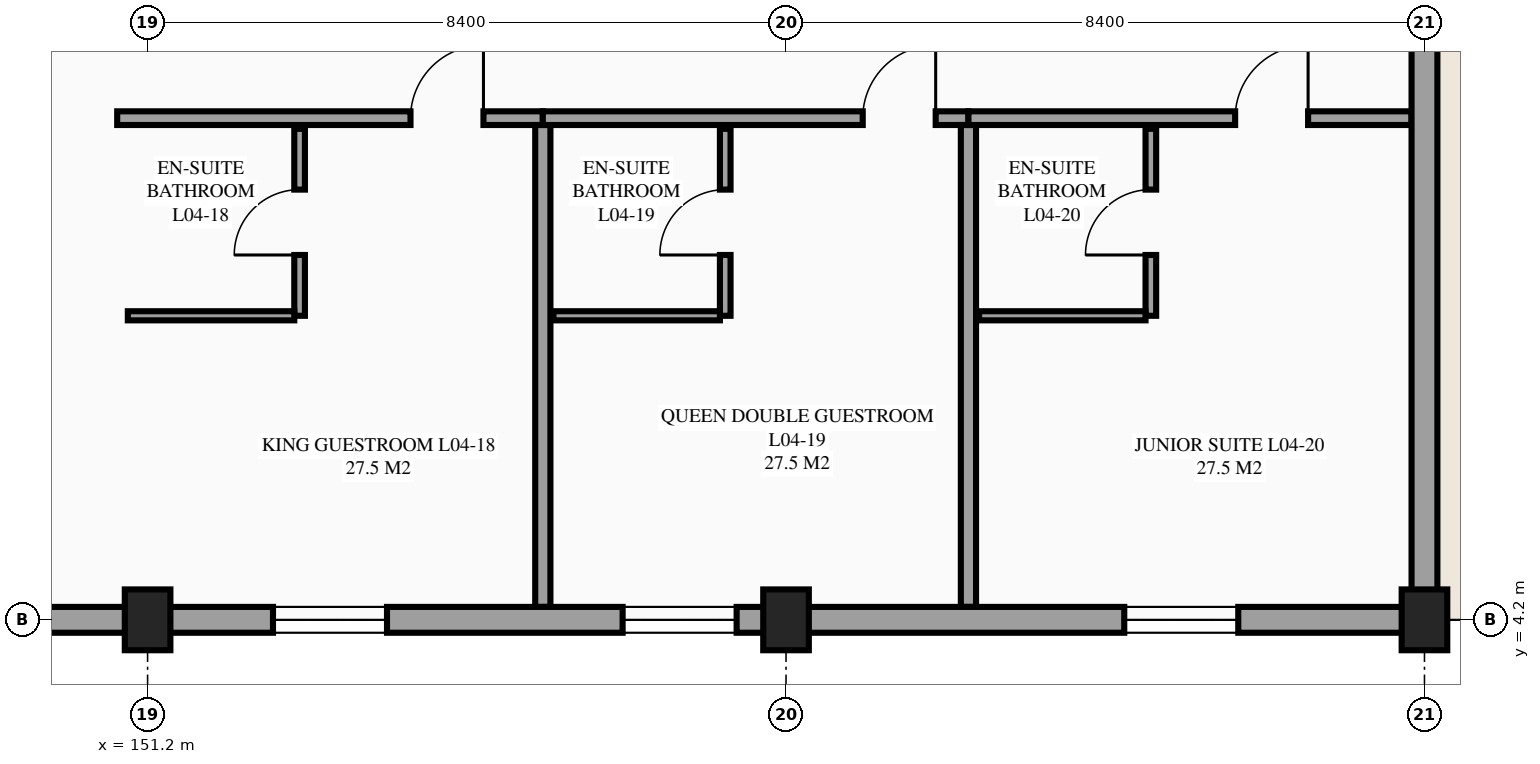
"""IFC4 building model, lengths in metres.
Left out: names, types, materials, properties, quantities, classifications, styles, units other than length and angle.
Written with IfcOpenShell. Run it as: python <this file> out.ifc"""

import sys

from ifc_helpers import new_model, si_unit, direction, frame, frame_2d, origin, origin_2d, place, context, subcontext, project, spatial, rectangle, extrude, element, fill, save


model = new_model("IFC4")
c1 = context("Model", 3, precision=1e-05, world=origin(), true_north=direction((0.0, 1.0)))
c2 = subcontext(c1, "Body", "Model", "MODEL_VIEW")
j1 = project(units=[si_unit("LENGTHUNIT", "METRE"), si_unit("PLANEANGLEUNIT", "RADIAN")], contexts=[c1])
p1 = place(None, origin())
s1 = spatial("IfcSite", under=j1, at=p1, CompositionType="ELEMENT")
p2 = place(p1, origin())
s2 = spatial("IfcBuilding", under=s1, at=p2, CompositionType="ELEMENT")
p3 = place(p2, frame((0.0, 0.0, 18.3)))
s3 = spatial("IfcBuildingStorey", under=s2, at=p3, CompositionType="ELEMENT", Elevation=18.3)
for number, where, z_axis, x_axis in (
    (1, (151.2, 4.2, 0.0), (0.0, 0.0, 1.0), (1.0, 0.0, 0.0)),
    (2, (159.6, 4.2, 0.0), (0.0, 0.0, 1.0), (1.0, 0.0, 0.0)),
    (3, (168.0, 4.2, 0.0), (0.0, 0.0, 1.0), (1.0, 0.0, 0.0)),
):
    element("IfcColumn", number, at=place(p3, frame(where, z_axis=z_axis, x_axis=x_axis)), inside=s3, PredefinedType="COLUMN", context=c2, shape_type="SweptSolid", body=[
        extrude(rectangle(XDim=0.6, YDim=0.8, at=origin_2d()), origin(), (0.0, 0.0, 1.0), 3.6),
    ])
p4 = place(p3, frame((150.8, 10.8, 0.0), z_axis=(0.0, 0.0, 1.0), x_axis=(1.0, 0.0, 0.0)))
e4 = element("IfcWall", 4, at=p4, inside=s3, PredefinedType="PARTITIONING", context=c2, shape_type="SweptSolid", body=[
    extrude(rectangle(XDim=5.6, YDim=0.18, at=frame_2d((2.8, 0.0))), origin(), (0.0, 0.0, 1.0), 3.375),
])
p5 = place(p4, frame((3.859, 0.0, 0.0)))
e5 = element("IfcOpeningElement", 5, at=p5, cuts=e4, PredefinedType="OPENING", context=c2, shape_type="SweptSolid", body=[
    extrude(rectangle(XDim=0.96, YDim=2.15, at=frame_2d((0.48, 1.075))), frame((0.0, 0.1, 0.0), z_axis=(0.0, -1.0, 0.0), x_axis=(1.0, 0.0, 0.0)), (0.0, 0.0, 1.0), 0.2),
])
p6 = place(p3, frame((156.4, 4.37, 0.0), z_axis=(0.0, 0.0, 1.0), x_axis=(0.0, 1.0, 0.0)))
e6 = element("IfcWall", 6, at=p6, inside=s3, PredefinedType="PARTITIONING", context=c2, shape_type="SweptSolid", body=[
    extrude(rectangle(XDim=6.34, YDim=0.2, at=frame_2d((3.17, 0.0))), origin(), (0.0, 0.0, 1.0), 3.375),
])
p7 = place(p3, frame((153.2, 8.2, 0.0), z_axis=(0.0, 0.0, 1.0), x_axis=(0.0, 1.0, 0.0)))
e7 = element("IfcWall", 7, at=p7, inside=s3, PredefinedType="PARTITIONING", context=c2, shape_type="SweptSolid", body=[
    extrude(rectangle(XDim=2.46, YDim=0.14, at=frame_2d((1.23, 0.0))), origin(), (0.0, 0.0, 1.0), 3.375),
])
p8 = place(p7, frame((0.8, 0.0, 0.0)))
e8 = element("IfcOpeningElement", 8, at=p8, cuts=e7, PredefinedType="OPENING", context=c2, shape_type="SweptSolid", body=[
    extrude(rectangle(XDim=0.86, YDim=2.1, at=frame_2d((0.43, 1.05))), frame((0.0, 0.08, 0.0), z_axis=(0.0, -1.0, 0.0), x_axis=(1.0, 0.0, 0.0)), (0.0, 0.0, 1.0), 0.16),
])
p9 = place(p3, frame((150.94, 8.2, 0.0), z_axis=(0.0, 0.0, 1.0), x_axis=(1.0, 0.0, 0.0)))
e9 = element("IfcWall", 9, at=p9, inside=s3, PredefinedType="PARTITIONING", context=c2, shape_type="SweptSolid", body=[
    extrude(rectangle(XDim=2.19, YDim=0.12, at=frame_2d((1.095, 0.0))), origin(), (0.0, 0.0, 1.0), 3.375),
])
p10 = place(p3, frame((156.4, 10.8, 0.0), z_axis=(0.0, 0.0, 1.0), x_axis=(1.0, 0.0, 0.0)))
e10 = element("IfcWall", 10, at=p10, inside=s3, PredefinedType="PARTITIONING", context=c2, shape_type="SweptSolid", body=[
    extrude(rectangle(XDim=5.6, YDim=0.18, at=frame_2d((2.8, 0.0))), origin(), (0.0, 0.0, 1.0), 3.375),
])
p11 = place(p10, frame((4.209, 0.0, 0.0)))
e11 = element("IfcOpeningElement", 11, at=p11, cuts=e10, PredefinedType="OPENING", context=c2, shape_type="SweptSolid", body=[
    extrude(rectangle(XDim=0.96, YDim=2.15, at=frame_2d((0.48, 1.075))), frame((0.0, 0.1, 0.0), z_axis=(0.0, -1.0, 0.0), x_axis=(1.0, 0.0, 0.0)), (0.0, 0.0, 1.0), 0.2),
])
p12 = place(p3, frame((162.0, 4.37, 0.0), z_axis=(0.0, 0.0, 1.0), x_axis=(0.0, 1.0, 0.0)))
e12 = element("IfcWall", 12, at=p12, inside=s3, PredefinedType="PARTITIONING", context=c2, shape_type="SweptSolid", body=[
    extrude(rectangle(XDim=6.34, YDim=0.2, at=frame_2d((3.17, 0.0))), origin(), (0.0, 0.0, 1.0), 3.375),
])
p13 = place(p3, frame((158.8, 8.2, 0.0), z_axis=(0.0, 0.0, 1.0), x_axis=(0.0, 1.0, 0.0)))
e13 = element("IfcWall", 13, at=p13, inside=s3, PredefinedType="PARTITIONING", context=c2, shape_type="SweptSolid", body=[
    extrude(rectangle(XDim=2.46, YDim=0.14, at=frame_2d((1.23, 0.0))), origin(), (0.0, 0.0, 1.0), 3.375),
])
p14 = place(p13, frame((0.8, 0.0, 0.0)))
e14 = element("IfcOpeningElement", 14, at=p14, cuts=e13, PredefinedType="OPENING", context=c2, shape_type="SweptSolid", body=[
    extrude(rectangle(XDim=0.86, YDim=2.1, at=frame_2d((0.43, 1.05))), frame((0.0, 0.08, 0.0), z_axis=(0.0, -1.0, 0.0), x_axis=(1.0, 0.0, 0.0)), (0.0, 0.0, 1.0), 0.16),
])
p15 = place(p3, frame((156.54, 8.2, 0.0), z_axis=(0.0, 0.0, 1.0), x_axis=(1.0, 0.0, 0.0)))
e15 = element("IfcWall", 15, at=p15, inside=s3, PredefinedType="PARTITIONING", context=c2, shape_type="SweptSolid", body=[
    extrude(rectangle(XDim=2.19, YDim=0.12, at=frame_2d((1.095, 0.0))), origin(), (0.0, 0.0, 1.0), 3.375),
])
p16 = place(p3, frame((162.0, 10.8, 0.0), z_axis=(0.0, 0.0, 1.0), x_axis=(1.0, 0.0, 0.0)))
e16 = element("IfcWall", 16, at=p16, inside=s3, PredefinedType="PARTITIONING", context=c2, shape_type="SweptSolid", body=[
    extrude(rectangle(XDim=5.83, YDim=0.18, at=frame_2d((2.915, 0.0))), origin(), (0.0, 0.0, 1.0), 3.375),
])
p17 = place(p16, frame((3.509, 0.0, 0.0)))
e17 = element("IfcOpeningElement", 17, at=p17, cuts=e16, PredefinedType="OPENING", context=c2, shape_type="SweptSolid", body=[
    extrude(rectangle(XDim=0.96, YDim=2.15, at=frame_2d((0.48, 1.075))), frame((0.0, 0.1, 0.0), z_axis=(0.0, -1.0, 0.0), x_axis=(1.0, 0.0, 0.0)), (0.0, 0.0, 1.0), 0.2),
])
p18 = place(p3, frame((164.4, 8.2, 0.0), z_axis=(0.0, 0.0, 1.0), x_axis=(0.0, 1.0, 0.0)))
e18 = element("IfcWall", 18, at=p18, inside=s3, PredefinedType="PARTITIONING", context=c2, shape_type="SweptSolid", body=[
    extrude(rectangle(XDim=2.46, YDim=0.14, at=frame_2d((1.23, 0.0))), origin(), (0.0, 0.0, 1.0), 3.375),
])
p19 = place(p18, frame((0.8, 0.0, 0.0)))
e19 = element("IfcOpeningElement", 19, at=p19, cuts=e18, PredefinedType="OPENING", context=c2, shape_type="SweptSolid", body=[
    extrude(rectangle(XDim=0.86, YDim=2.1, at=frame_2d((0.43, 1.05))), frame((0.0, 0.08, 0.0), z_axis=(0.0, -1.0, 0.0), x_axis=(1.0, 0.0, 0.0)), (0.0, 0.0, 1.0), 0.16),
])
p20 = place(p3, frame((162.14, 8.2, 0.0), z_axis=(0.0, 0.0, 1.0), x_axis=(1.0, 0.0, 0.0)))
e20 = element("IfcWall", 20, at=p20, inside=s3, PredefinedType="PARTITIONING", context=c2, shape_type="SweptSolid", body=[
    extrude(rectangle(XDim=2.19, YDim=0.12, at=frame_2d((1.095, 0.0))), origin(), (0.0, 0.0, 1.0), 3.375),
])
p21 = place(p3, frame((142.8, 4.2, 0.0), z_axis=(0.0, 0.0, 1.0), x_axis=(1.0, 0.0, 0.0)))
e21 = element("IfcWall", 21, at=p21, inside=s3, PredefinedType="STANDARD", context=c2, shape_type="SweptSolid", body=[
    extrude(rectangle(XDim=8.4, YDim=0.34, at=frame_2d((4.2, 0.0))), origin(), (0.0, 0.0, 1.0), 3.126),
])
p22 = place(p3, frame((151.2, 4.2, 0.0), z_axis=(0.0, 0.0, 1.0), x_axis=(1.0, 0.0, 0.0)))
e22 = element("IfcWall", 22, at=p22, inside=s3, PredefinedType="STANDARD", context=c2, shape_type="SweptSolid", body=[
    extrude(rectangle(XDim=8.4, YDim=0.34, at=frame_2d((4.2, 0.0))), origin(), (0.0, 0.0, 1.0), 2.43),
])
p23 = place(p22, frame((1.65, 0.0, 0.85)))
e23 = element("IfcOpeningElement", 23, at=p23, cuts=e22, PredefinedType="OPENING", context=c2, shape_type="SweptSolid", body=[
    extrude(rectangle(XDim=1.5, YDim=1.5, at=frame_2d((0.75, 0.75))), frame((0.0, 0.18, 0.0), z_axis=(0.0, -1.0, 0.0), x_axis=(1.0, 0.0, 0.0)), (0.0, 0.0, 1.0), 0.36),
])
p24 = place(p22, frame((6.25, 0.0, 0.85)))
e24 = element("IfcOpeningElement", 24, at=p24, cuts=e22, PredefinedType="OPENING", context=c2, shape_type="SweptSolid", body=[
    extrude(rectangle(XDim=1.5, YDim=1.5, at=frame_2d((0.75, 0.75))), frame((0.0, 0.18, 0.0), z_axis=(0.0, -1.0, 0.0), x_axis=(1.0, 0.0, 0.0)), (0.0, 0.0, 1.0), 0.36),
])
p25 = place(p3, frame((159.6, 4.2, 0.0), z_axis=(0.0, 0.0, 1.0), x_axis=(1.0, 0.0, 0.0)))
e25 = element("IfcWall", 25, at=p25, inside=s3, PredefinedType="STANDARD", context=c2, shape_type="SweptSolid", body=[
    extrude(rectangle(XDim=8.4, YDim=0.34, at=frame_2d((4.2, 0.0))), origin(), (0.0, 0.0, 1.0), 2.53),
])
p26 = place(p25, frame((4.45, 0.0, 0.85)))
e26 = element("IfcOpeningElement", 26, at=p26, cuts=e25, PredefinedType="OPENING", context=c2, shape_type="SweptSolid", body=[
    extrude(rectangle(XDim=1.5, YDim=1.5, at=frame_2d((0.75, 0.75))), frame((0.0, 0.18, 0.0), z_axis=(0.0, -1.0, 0.0), x_axis=(1.0, 0.0, 0.0)), (0.0, 0.0, 1.0), 0.36),
])
p27 = place(p3, frame((168.0, 4.2, 0.0), z_axis=(0.0, 0.0, 1.0), x_axis=(0.0, 1.0, 0.0)))
e27 = element("IfcWall", 27, at=p27, inside=s3, PredefinedType="STANDARD", context=c2, shape_type="SweptSolid", body=[
    extrude(rectangle(XDim=8.4, YDim=0.34, at=frame_2d((4.2, 0.0))), origin(), (0.0, 0.0, 1.0), 2.78),
])
p28 = place(p23, origin())
e28 = element("IfcWindow", 28, at=p28, inside=s3, PartitioningType="SINGLE_PANEL", PredefinedType="WINDOW", context=c2, shape_type="SweptSolid", body=[
    extrude(rectangle(XDim=1.5, YDim=1.5, at=frame_2d((0.75, 0.75))), frame((0.0, 0.03, 0.0), z_axis=(0.0, -1.0, 0.0), x_axis=(1.0, 0.0, 0.0)), (0.0, 0.0, 1.0), 0.06),
])
fill(e23, e28)
p29 = place(p24, origin())
e29 = element("IfcWindow", 29, at=p29, inside=s3, PartitioningType="SINGLE_PANEL", PredefinedType="WINDOW", context=c2, shape_type="SweptSolid", body=[
    extrude(rectangle(XDim=1.5, YDim=1.5, at=frame_2d((0.75, 0.75))), frame((0.0, 0.03, 0.0), z_axis=(0.0, -1.0, 0.0), x_axis=(1.0, 0.0, 0.0)), (0.0, 0.0, 1.0), 0.06),
])
fill(e24, e29)
p30 = place(p26, origin())
e30 = element("IfcWindow", 30, at=p30, inside=s3, PartitioningType="SINGLE_PANEL", PredefinedType="WINDOW", context=c2, shape_type="SweptSolid", body=[
    extrude(rectangle(XDim=1.5, YDim=1.5, at=frame_2d((0.75, 0.75))), frame((0.0, 0.03, 0.0), z_axis=(0.0, -1.0, 0.0), x_axis=(1.0, 0.0, 0.0)), (0.0, 0.0, 1.0), 0.06),
])
fill(e26, e30)
p31 = place(p5, origin())
e31 = element("IfcDoor", 31, at=p31, inside=s3, OperationType="SINGLE_SWING_RIGHT", PredefinedType="DOOR", context=c2, shape_type="SweptSolid", body=[
    extrude(rectangle(XDim=0.96, YDim=2.15, at=frame_2d((0.48, 1.075))), frame((0.0, 0.025, 0.0), z_axis=(0.0, -1.0, 0.0), x_axis=(1.0, 0.0, 0.0)), (0.0, 0.0, 1.0), 0.05),
])
fill(e5, e31)
p32 = place(p8, origin())
e32 = element("IfcDoor", 32, at=p32, inside=s3, OperationType="SINGLE_SWING_LEFT", PredefinedType="DOOR", context=c2, shape_type="SweptSolid", body=[
    extrude(rectangle(XDim=0.86, YDim=2.1, at=frame_2d((0.43, 1.05))), frame((0.0, 0.025, 0.0), z_axis=(0.0, -1.0, 0.0), x_axis=(1.0, 0.0, 0.0)), (0.0, 0.0, 1.0), 0.05),
])
fill(e8, e32)
p33 = place(p11, origin())
e33 = element("IfcDoor", 33, at=p33, inside=s3, OperationType="SINGLE_SWING_RIGHT", PredefinedType="DOOR", context=c2, shape_type="SweptSolid", body=[
    extrude(rectangle(XDim=0.96, YDim=2.15, at=frame_2d((0.48, 1.075))), frame((0.0, 0.025, 0.0), z_axis=(0.0, -1.0, 0.0), x_axis=(1.0, 0.0, 0.0)), (0.0, 0.0, 1.0), 0.05),
])
fill(e11, e33)
p34 = place(p14, origin())
e34 = element("IfcDoor", 34, at=p34, inside=s3, OperationType="SINGLE_SWING_LEFT", PredefinedType="DOOR", context=c2, shape_type="SweptSolid", body=[
    extrude(rectangle(XDim=0.86, YDim=2.1, at=frame_2d((0.43, 1.05))), frame((0.0, 0.025, 0.0), z_axis=(0.0, -1.0, 0.0), x_axis=(1.0, 0.0, 0.0)), (0.0, 0.0, 1.0), 0.05),
])
fill(e14, e34)
p35 = place(p17, origin())
e35 = element("IfcDoor", 35, at=p35, inside=s3, OperationType="SINGLE_SWING_RIGHT", PredefinedType="DOOR", context=c2, shape_type="SweptSolid", body=[
    extrude(rectangle(XDim=0.96, YDim=2.15, at=frame_2d((0.48, 1.075))), frame((0.0, 0.025, 0.0), z_axis=(0.0, -1.0, 0.0), x_axis=(1.0, 0.0, 0.0)), (0.0, 0.0, 1.0), 0.05),
])
fill(e17, e35)
p36 = place(p19, origin())
e36 = element("IfcDoor", 36, at=p36, inside=s3, OperationType="SINGLE_SWING_LEFT", PredefinedType="DOOR", context=c2, shape_type="SweptSolid", body=[
    extrude(rectangle(XDim=0.86, YDim=2.1, at=frame_2d((0.43, 1.05))), frame((0.0, 0.025, 0.0), z_axis=(0.0, -1.0, 0.0), x_axis=(1.0, 0.0, 0.0)), (0.0, 0.0, 1.0), 0.05),
])
fill(e19, e36)
save(model, sys.argv[1])
